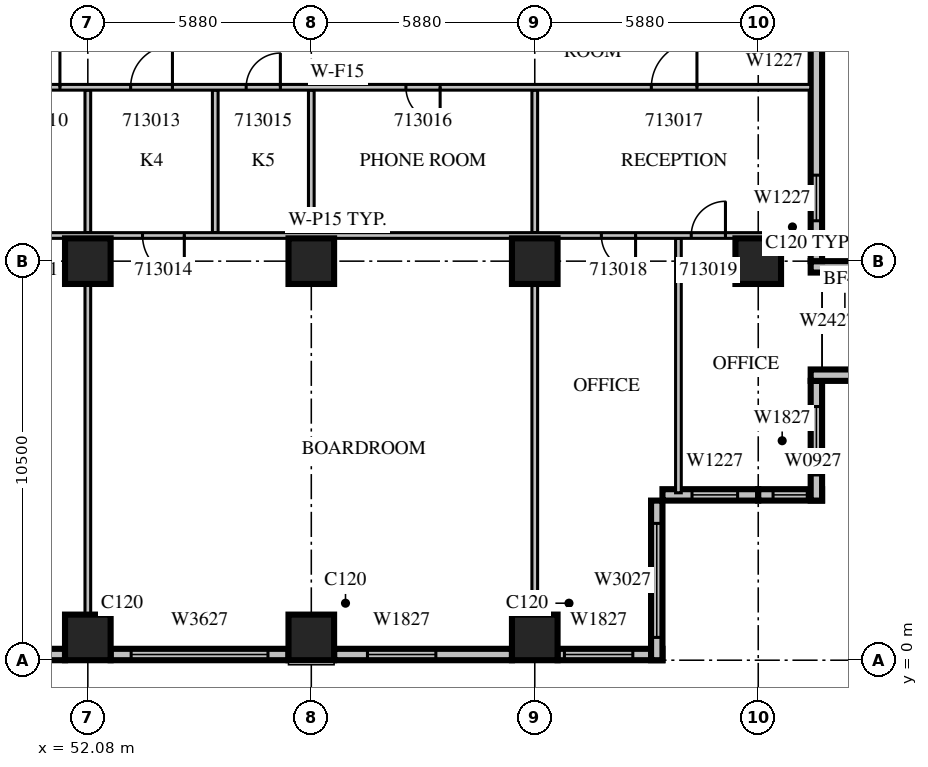
"""IFC4 building model, lengths in metres.
Left out: names, types, materials, properties, quantities, classifications, styles, units other than length and angle.
Written with IfcOpenShell. Run it as: python <this file> out.ifc"""

import sys

from ifc_helpers import new_model, si_unit, direction, frame, frame_2d, origin, origin_2d, place, context, subcontext, project, spatial, rectangle, extrude, source, transform, mapped, element, fill, save


model = new_model("IFC4")
c1 = context("Model", 3, precision=1e-05, world=origin(), true_north=direction((0.0, 1.0)))
c2 = subcontext(c1, "Body", "Model", "MODEL_VIEW")
j1 = project(units=[si_unit("LENGTHUNIT", "METRE"), si_unit("PLANEANGLEUNIT", "RADIAN")], contexts=[c1])
p1 = place(None, origin())
s1 = spatial("IfcSite", under=j1, at=p1, CompositionType="ELEMENT")
p2 = place(p1, origin())
s2 = spatial("IfcBuilding", under=s1, at=p2, CompositionType="ELEMENT")
p3 = place(p2, frame((0.0, 0.0, 65.7)))
s3 = spatial("IfcBuildingStorey", under=s2, at=p3, CompositionType="ELEMENT", Elevation=65.7)
m1 = source(origin(), c2, "Body", "SweptSolid", [
    extrude(rectangle(XDim=1.2, YDim=1.2, at=origin_2d()), origin(), (0.0, 0.0, 1.0), 4.2),
])
for number, where, z_axis, x_axis in (
    (1, (52.08, 0.6, 0.0), (0.0, 0.0, 1.0), (1.0, 0.0, 0.0)),
    (2, (57.96, 0.6, 0.0), (0.0, 0.0, 1.0), (1.0, 0.0, 0.0)),
    (3, (63.84, 0.6, 0.0), (0.0, 0.0, 1.0), (1.0, 0.0, 0.0)),
    (4, (52.08, 10.5, 0.0), (0.0, 0.0, 1.0), (1.0, 0.0, 0.0)),
    (5, (57.96, 10.5, 0.0), (0.0, 0.0, 1.0), (1.0, 0.0, 0.0)),
    (6, (63.84, 10.5, 0.0), (0.0, 0.0, 1.0), (1.0, 0.0, 0.0)),
    (7, (69.72, 10.5, 0.0), (0.0, 0.0, 1.0), (1.0, 0.0, 0.0)),
):
    element("IfcColumn", number, at=place(p3, frame(where, z_axis=z_axis, x_axis=x_axis)), inside=s3, PredefinedType="COLUMN", context=c2, shape_type="MappedRepresentation", body=[
        mapped(m1, transform((0.0, 0.0, 0.0), scale=1.0)),
    ])
m2 = source(origin(), c2, "Body", "SweptSolid", [
    extrude(rectangle(XDim=4.68, YDim=0.3, at=frame_2d((2.34, 0.0))), origin(), (0.0, 0.0, 1.0), 3.8),
])
p4 = place(p3, frame((46.8, 0.15, 0.0), z_axis=(0.0, 0.0, 1.0), x_axis=(1.0, 0.0, 0.0)))
e8 = element("IfcWall", 8, at=p4, inside=s3, PredefinedType="STANDARD", context=c2, shape_type="MappedRepresentation", body=[
    mapped(m2, transform((0.0, 0.0, 0.0), scale=1.0)),
])
m3 = source(origin(), c2, "Body", "SweptSolid", [
    extrude(rectangle(XDim=3.6, YDim=2.7, at=frame_2d((1.8, 1.35))), frame((0.0, 0.16, 0.0), z_axis=(0.0, -1.0, 0.0), x_axis=(1.0, 0.0, 0.0)), (0.0, 0.0, 1.0), 0.32),
])
p5 = place(p4, frame((0.54, 0.0, 0.6)))
e9 = element("IfcOpeningElement", 9, at=p5, cuts=e8, PredefinedType="OPENING", context=c2, shape_type="MappedRepresentation", body=[
    mapped(m3, transform((0.0, 0.0, 0.0), scale=1.0)),
])
p6 = place(p3, frame((52.68, 0.15, 0.0), z_axis=(0.0, 0.0, 1.0), x_axis=(1.0, 0.0, 0.0)))
e10 = element("IfcWall", 10, at=p6, inside=s3, PredefinedType="STANDARD", context=c2, shape_type="MappedRepresentation", body=[
    mapped(m2, transform((0.0, 0.0, 0.0), scale=1.0)),
])
p7 = place(p6, frame((0.54, 0.0, 0.6)))
e11 = element("IfcOpeningElement", 11, at=p7, cuts=e10, PredefinedType="OPENING", context=c2, shape_type="MappedRepresentation", body=[
    mapped(m3, transform((0.0, 0.0, 0.0), scale=1.0)),
])
p8 = place(p3, frame((58.56, 0.15, 0.0), z_axis=(0.0, 0.0, 1.0), x_axis=(1.0, 0.0, 0.0)))
e12 = element("IfcWall", 12, at=p8, inside=s3, PredefinedType="STANDARD", context=c2, shape_type="MappedRepresentation", body=[
    mapped(m2, transform((0.0, 0.0, 0.0), scale=1.0)),
])
m4 = source(origin(), c2, "Body", "SweptSolid", [
    extrude(rectangle(XDim=1.8, YDim=2.7, at=frame_2d((0.9, 1.35))), frame((0.0, 0.16, 0.0), z_axis=(0.0, -1.0, 0.0), x_axis=(1.0, 0.0, 0.0)), (0.0, 0.0, 1.0), 0.32),
])
p9 = place(p8, frame((0.877, 0.0, 0.6)))
e13 = element("IfcOpeningElement", 13, at=p9, cuts=e12, PredefinedType="OPENING", context=c2, shape_type="MappedRepresentation", body=[
    mapped(m4, transform((0.0, 0.0, 0.0), scale=1.0)),
])
m5 = source(origin(), c2, "Body", "SweptSolid", [
    extrude(rectangle(XDim=2.76, YDim=0.3, at=frame_2d((1.38, 0.0))), origin(), (0.0, 0.0, 1.0), 3.8),
])
p10 = place(p3, frame((64.44, 0.15, 0.0), z_axis=(0.0, 0.0, 1.0), x_axis=(1.0, 0.0, 0.0)))
e14 = element("IfcWall", 14, at=p10, inside=s3, PredefinedType="STANDARD", context=c2, shape_type="MappedRepresentation", body=[
    mapped(m5, transform((0.0, 0.0, 0.0), scale=1.0)),
])
p11 = place(p10, frame((0.18, 0.0, 0.6)))
e15 = element("IfcOpeningElement", 15, at=p11, cuts=e14, PredefinedType="OPENING", context=c2, shape_type="MappedRepresentation", body=[
    mapped(m4, transform((0.0, 0.0, 0.0), scale=1.0)),
])
m6 = source(origin(), c2, "Body", "SweptSolid", [
    extrude(rectangle(XDim=4.2, YDim=0.3, at=frame_2d((2.1, 0.0))), origin(), (0.0, 0.0, 1.0), 3.8),
])
p12 = place(p3, frame((67.05, 0.0, 0.0), z_axis=(0.0, 0.0, 1.0), x_axis=(0.0, 1.0, 0.0)))
e16 = element("IfcWall", 16, at=p12, inside=s3, PredefinedType="STANDARD", context=c2, shape_type="MappedRepresentation", body=[
    mapped(m6, transform((0.0, 0.0, 0.0), scale=1.0)),
])
m7 = source(origin(), c2, "Body", "SweptSolid", [
    extrude(rectangle(XDim=3.0, YDim=2.7, at=frame_2d((1.5, 1.35))), frame((0.0, 0.16, 0.0), z_axis=(0.0, -1.0, 0.0), x_axis=(1.0, 0.0, 0.0)), (0.0, 0.0, 1.0), 0.32),
])
p13 = place(p12, frame((0.6, 0.0, 0.6)))
e17 = element("IfcOpeningElement", 17, at=p13, cuts=e16, PredefinedType="OPENING", context=c2, shape_type="MappedRepresentation", body=[
    mapped(m7, transform((0.0, 0.0, 0.0), scale=1.0)),
])
m8 = source(origin(), c2, "Body", "SweptSolid", [
    extrude(rectangle(XDim=2.52, YDim=0.3, at=frame_2d((1.26, 0.0))), origin(), (0.0, 0.0, 1.0), 3.8),
])
p14 = place(p3, frame((67.2, 4.35, 0.0), z_axis=(0.0, 0.0, 1.0), x_axis=(1.0, 0.0, 0.0)))
e18 = element("IfcWall", 18, at=p14, inside=s3, PredefinedType="STANDARD", context=c2, shape_type="MappedRepresentation", body=[
    mapped(m8, transform((0.0, 0.0, 0.0), scale=1.0)),
])
m9 = source(origin(), c2, "Body", "SweptSolid", [
    extrude(rectangle(XDim=1.2, YDim=2.7, at=frame_2d((0.6, 1.35))), frame((0.0, 0.16, 0.0), z_axis=(0.0, -1.0, 0.0), x_axis=(1.0, 0.0, 0.0)), (0.0, 0.0, 1.0), 0.32),
])
p15 = place(p14, frame((0.777, 0.0, 0.6)))
e19 = element("IfcOpeningElement", 19, at=p15, cuts=e18, PredefinedType="OPENING", context=c2, shape_type="MappedRepresentation", body=[
    mapped(m9, transform((0.0, 0.0, 0.0), scale=1.0)),
])
m10 = source(origin(), c2, "Body", "SweptSolid", [
    extrude(rectangle(XDim=1.68, YDim=0.3, at=frame_2d((0.84, 0.0))), origin(), (0.0, 0.0, 1.0), 3.8),
])
p16 = place(p3, frame((69.72, 4.35, 0.0), z_axis=(0.0, 0.0, 1.0), x_axis=(1.0, 0.0, 0.0)))
e20 = element("IfcWall", 20, at=p16, inside=s3, PredefinedType="STANDARD", context=c2, shape_type="MappedRepresentation", body=[
    mapped(m10, transform((0.0, 0.0, 0.0), scale=1.0)),
])
m11 = source(origin(), c2, "Body", "SweptSolid", [
    extrude(rectangle(XDim=0.9, YDim=2.7, at=frame_2d((0.45, 1.35))), frame((0.0, 0.16, 0.0), z_axis=(0.0, -1.0, 0.0), x_axis=(1.0, 0.0, 0.0)), (0.0, 0.0, 1.0), 0.32),
])
p17 = place(p16, frame((0.39, 0.0, 0.6)))
e21 = element("IfcOpeningElement", 21, at=p17, cuts=e20, PredefinedType="OPENING", context=c2, shape_type="MappedRepresentation", body=[
    mapped(m11, transform((0.0, 0.0, 0.0), scale=1.0)),
])
m12 = source(origin(), c2, "Body", "SweptSolid", [
    extrude(rectangle(XDim=3.15, YDim=0.3, at=frame_2d((1.575, 0.0))), origin(), (0.0, 0.0, 1.0), 3.8),
])
p18 = place(p3, frame((71.25, 4.2, 0.0), z_axis=(0.0, 0.0, 1.0), x_axis=(0.0, 1.0, 0.0)))
e22 = element("IfcWall", 22, at=p18, inside=s3, PredefinedType="STANDARD", context=c2, shape_type="MappedRepresentation", body=[
    mapped(m12, transform((0.0, 0.0, 0.0), scale=1.0)),
])
p19 = place(p18, frame((0.675, 0.0, 0.6)))
e23 = element("IfcOpeningElement", 23, at=p19, cuts=e22, PredefinedType="OPENING", context=c2, shape_type="MappedRepresentation", body=[
    mapped(m4, transform((0.0, 0.0, 0.0), scale=1.0)),
])
m13 = source(origin(), c2, "Body", "SweptSolid", [
    extrude(rectangle(XDim=1.2, YDim=0.3, at=frame_2d((0.6, 0.0))), origin(), (0.0, 0.0, 1.0), 3.8),
])
for number, where, z_axis, x_axis in (
    (24, (71.1, 7.5, 0.0), (0.0, 0.0, 1.0), (1.0, 0.0, 0.0)),
    (25, (71.1, 10.35, 0.0), (0.0, 0.0, 1.0), (1.0, 0.0, 0.0)),
):
    element("IfcWall", number, at=place(p3, frame(where, z_axis=z_axis, x_axis=x_axis)), inside=s3, PredefinedType="STANDARD", context=c2, shape_type="MappedRepresentation", body=[
        mapped(m13, transform((0.0, 0.0, 0.0), scale=1.0)),
    ])
m14 = source(origin(), c2, "Body", "SweptSolid", [
    extrude(rectangle(XDim=6.3, YDim=0.3, at=frame_2d((3.15, 0.0))), origin(), (0.0, 0.0, 1.0), 3.8),
])
p20 = place(p3, frame((71.25, 10.5, 0.0), z_axis=(0.0, 0.0, 1.0), x_axis=(0.0, 1.0, 0.0)))
e26 = element("IfcWall", 26, at=p20, inside=s3, PredefinedType="STANDARD", context=c2, shape_type="MappedRepresentation", body=[
    mapped(m14, transform((0.0, 0.0, 0.0), scale=1.0)),
])
p21 = place(p20, frame((1.062, 0.0, 0.6)))
e27 = element("IfcOpeningElement", 27, at=p21, cuts=e26, PredefinedType="OPENING", context=c2, shape_type="MappedRepresentation", body=[
    mapped(m9, transform((0.0, 0.0, 0.0), scale=1.0)),
])
m15 = source(origin(), c2, "Body", "SweptSolid", [
    extrude(rectangle(XDim=3.75, YDim=0.15, at=frame_2d((1.875, 0.0))), origin(), (0.0, 0.0, 1.0), 3.8),
])
for number, where, z_axis, x_axis in (
    (28, (55.433, 11.25, 0.0), (0.0, 0.0, 1.0), (0.0, 1.0, 0.0)),
    (29, (57.96, 11.25, 0.0), (0.0, 0.0, 1.0), (0.0, 1.0, 0.0)),
):
    element("IfcWall", number, at=place(p3, frame(where, z_axis=z_axis, x_axis=x_axis)), inside=s3, PredefinedType="PARTITIONING", context=c2, shape_type="MappedRepresentation", body=[
        mapped(m15, transform((0.0, 0.0, 0.0), scale=1.0)),
    ])
m16 = source(origin(), c2, "Body", "SweptSolid", [
    extrude(rectangle(XDim=6.695, YDim=0.15, at=frame_2d((3.348, 0.0))), origin(), (0.0, 0.0, 1.0), 3.8),
])
p22 = place(p3, frame((67.62, 4.405, 0.0), z_axis=(0.0, 0.0, 1.0), x_axis=(0.0, 1.0, 0.0)))
e30 = element("IfcWall", 30, at=p22, inside=s3, PredefinedType="PARTITIONING", context=c2, shape_type="MappedRepresentation", body=[
    mapped(m16, transform((0.0, 0.0, 0.0), scale=1.0)),
])
m17 = source(origin(), c2, "Body", "SweptSolid", [
    extrude(rectangle(XDim=8.702, YDim=0.15, at=frame_2d((4.351, 0.0))), origin(), (0.0, 0.0, 1.0), 3.8),
])
p23 = place(p3, frame((52.08, 1.199, 0.0), z_axis=(0.0, 0.0, 1.0), x_axis=(0.0, 1.0, 0.0)))
e31 = element("IfcWall", 31, at=p23, inside=s3, PredefinedType="PARTITIONING", context=c2, shape_type="MappedRepresentation", body=[
    mapped(m17, transform((0.0, 0.0, 0.0), scale=1.0)),
])
p24 = place(p3, frame((52.08, 11.25, 0.0), z_axis=(0.0, 0.0, 1.0), x_axis=(0.0, 1.0, 0.0)))
e32 = element("IfcWall", 32, at=p24, inside=s3, PredefinedType="PARTITIONING", context=c2, shape_type="MappedRepresentation", body=[
    mapped(m15, transform((0.0, 0.0, 0.0), scale=1.0)),
])
p25 = place(p3, frame((63.84, 1.199, 0.0), z_axis=(0.0, 0.0, 1.0), x_axis=(0.0, 1.0, 0.0)))
e33 = element("IfcWall", 33, at=p25, inside=s3, PredefinedType="PARTITIONING", context=c2, shape_type="MappedRepresentation", body=[
    mapped(m17, transform((0.0, 0.0, 0.0), scale=1.0)),
])
p26 = place(p3, frame((63.84, 11.25, 0.0), z_axis=(0.0, 0.0, 1.0), x_axis=(0.0, 1.0, 0.0)))
e34 = element("IfcWall", 34, at=p26, inside=s3, PredefinedType="PARTITIONING", context=c2, shape_type="MappedRepresentation", body=[
    mapped(m15, transform((0.0, 0.0, 0.0), scale=1.0)),
])
m18 = source(origin(), c2, "Body", "SweptSolid", [
    extrude(rectangle(XDim=24.9, YDim=0.15, at=frame_2d((12.45, 0.0))), origin(), (0.0, 0.0, 1.0), 3.8),
])
p27 = place(p3, frame((71.1, 11.175, 0.0), z_axis=(0.0, 0.0, 1.0), x_axis=(-1.0, 0.0, 0.0)))
e35 = element("IfcWall", 35, at=p27, inside=s3, PredefinedType="PARTITIONING", context=c2, shape_type="MappedRepresentation", body=[
    mapped(m18, transform((0.0, 0.0, 0.0), scale=1.0)),
])
m19 = source(origin(), c2, "Body", "SweptSolid", [
    extrude(rectangle(XDim=1.1, YDim=2.1, at=frame_2d((0.55, 1.05))), frame((0.0, 0.085, 0.0), z_axis=(0.0, -1.0, 0.0), x_axis=(1.0, 0.0, 0.0)), (0.0, 0.0, 1.0), 0.17),
])
p28 = place(p27, frame((20.017, 0.0, 0.0)))
e36 = element("IfcOpeningElement", 36, at=p28, cuts=e35, PredefinedType="OPENING", context=c2, shape_type="MappedRepresentation", body=[
    mapped(m19, transform((0.0, 0.0, 0.0), scale=1.0)),
])
p29 = place(p27, frame((16.481, 0.0, 0.0)))
e37 = element("IfcOpeningElement", 37, at=p29, cuts=e35, PredefinedType="OPENING", context=c2, shape_type="MappedRepresentation", body=[
    mapped(m19, transform((0.0, 0.0, 0.0), scale=1.0)),
])
m20 = source(origin(), c2, "Body", "SweptSolid", [
    extrude(rectangle(XDim=0.9, YDim=2.1, at=frame_2d((0.45, 1.05))), frame((0.0, 0.085, 0.0), z_axis=(0.0, -1.0, 0.0), x_axis=(1.0, 0.0, 0.0)), (0.0, 0.0, 1.0), 0.17),
])
p30 = place(p27, frame((4.607, 0.0, 0.0)))
e38 = element("IfcOpeningElement", 38, at=p30, cuts=e35, PredefinedType="OPENING", context=c2, shape_type="MappedRepresentation", body=[
    mapped(m20, transform((0.0, 0.0, 0.0), scale=1.0)),
])
p31 = place(p27, frame((2.243, 0.0, 0.0)))
e39 = element("IfcOpeningElement", 39, at=p31, cuts=e35, PredefinedType="OPENING", context=c2, shape_type="MappedRepresentation", body=[
    mapped(m20, transform((0.0, 0.0, 0.0), scale=1.0)),
])
p32 = place(p3, frame((71.1, 15.075, 0.0), z_axis=(0.0, 0.0, 1.0), x_axis=(-1.0, 0.0, 0.0)))
e40 = element("IfcWall", 40, at=p32, inside=s3, PredefinedType="PARTITIONING", context=c2, shape_type="MappedRepresentation", body=[
    mapped(m18, transform((0.0, 0.0, 0.0), scale=1.0)),
])
p33 = place(p32, frame((19.754, 0.0, 0.0)))
e41 = element("IfcOpeningElement", 41, at=p33, cuts=e40, PredefinedType="OPENING", context=c2, shape_type="MappedRepresentation", body=[
    mapped(m19, transform((0.0, 0.0, 0.0), scale=1.0)),
])
p34 = place(p32, frame((22.794, 0.0, 0.0)))
e42 = element("IfcOpeningElement", 42, at=p34, cuts=e40, PredefinedType="OPENING", context=c2, shape_type="MappedRepresentation", body=[
    mapped(m20, transform((0.0, 0.0, 0.0), scale=1.0)),
])
p35 = place(p32, frame((16.794, 0.0, 0.0)))
e43 = element("IfcOpeningElement", 43, at=p35, cuts=e40, PredefinedType="OPENING", context=c2, shape_type="MappedRepresentation", body=[
    mapped(m19, transform((0.0, 0.0, 0.0), scale=1.0)),
])
p36 = place(p32, frame((13.954, 0.0, 0.0)))
e44 = element("IfcOpeningElement", 44, at=p36, cuts=e40, PredefinedType="OPENING", context=c2, shape_type="MappedRepresentation", body=[
    mapped(m20, transform((0.0, 0.0, 0.0), scale=1.0)),
])
p37 = place(p32, frame((9.75, 0.0, 0.0)))
e45 = element("IfcOpeningElement", 45, at=p37, cuts=e40, PredefinedType="OPENING", context=c2, shape_type="MappedRepresentation", body=[
    mapped(m20, transform((0.0, 0.0, 0.0), scale=1.0)),
])
m21 = source(origin(), c2, "Body", "SweptSolid", [
    extrude(rectangle(XDim=1.2, YDim=2.1, at=frame_2d((0.6, 1.05))), frame((0.0, 0.085, 0.0), z_axis=(0.0, -1.0, 0.0), x_axis=(1.0, 0.0, 0.0)), (0.0, 0.0, 1.0), 0.17),
])
p38 = place(p32, frame((2.993, 0.0, 0.0)))
e46 = element("IfcOpeningElement", 46, at=p38, cuts=e40, PredefinedType="OPENING", context=c2, shape_type="MappedRepresentation", body=[
    mapped(m21, transform((0.0, 0.0, 0.0), scale=1.0)),
])
m22 = source(origin(), c2, "Body", "SweptSolid", [
    extrude(rectangle(XDim=3.6, YDim=2.7, at=frame_2d((1.8, 1.35))), frame((0.0, 0.03, 0.0), z_axis=(0.0, -1.0, 0.0), x_axis=(1.0, 0.0, 0.0)), (0.0, 0.0, 1.0), 0.06),
])
p39 = place(p7, origin())
e47 = element("IfcWindow", 47, at=p39, inside=s3, PartitioningType="SINGLE_PANEL", PredefinedType="WINDOW", context=c2, shape_type="MappedRepresentation", body=[
    mapped(m22, transform((0.0, 0.0, 0.0), scale=1.0)),
])
fill(e11, e47)
m23 = source(origin(), c2, "Body", "SweptSolid", [
    extrude(rectangle(XDim=1.8, YDim=2.7, at=frame_2d((0.9, 1.35))), frame((0.0, 0.03, 0.0), z_axis=(0.0, -1.0, 0.0), x_axis=(1.0, 0.0, 0.0)), (0.0, 0.0, 1.0), 0.06),
])
p40 = place(p9, origin())
e48 = element("IfcWindow", 48, at=p40, inside=s3, PartitioningType="SINGLE_PANEL", PredefinedType="WINDOW", context=c2, shape_type="MappedRepresentation", body=[
    mapped(m23, transform((0.0, 0.0, 0.0), scale=1.0)),
])
fill(e13, e48)
p41 = place(p11, origin())
e49 = element("IfcWindow", 49, at=p41, inside=s3, PartitioningType="SINGLE_PANEL", PredefinedType="WINDOW", context=c2, shape_type="MappedRepresentation", body=[
    mapped(m23, transform((0.0, 0.0, 0.0), scale=1.0)),
])
fill(e15, e49)
m24 = source(origin(), c2, "Body", "SweptSolid", [
    extrude(rectangle(XDim=3.0, YDim=2.7, at=frame_2d((1.5, 1.35))), frame((0.0, 0.03, 0.0), z_axis=(0.0, -1.0, 0.0), x_axis=(1.0, 0.0, 0.0)), (0.0, 0.0, 1.0), 0.06),
])
p42 = place(p13, origin())
e50 = element("IfcWindow", 50, at=p42, inside=s3, PartitioningType="SINGLE_PANEL", PredefinedType="WINDOW", context=c2, shape_type="MappedRepresentation", body=[
    mapped(m24, transform((0.0, 0.0, 0.0), scale=1.0)),
])
fill(e17, e50)
m25 = source(origin(), c2, "Body", "SweptSolid", [
    extrude(rectangle(XDim=1.2, YDim=2.7, at=frame_2d((0.6, 1.35))), frame((0.0, 0.03, 0.0), z_axis=(0.0, -1.0, 0.0), x_axis=(1.0, 0.0, 0.0)), (0.0, 0.0, 1.0), 0.06),
])
p43 = place(p15, origin())
e51 = element("IfcWindow", 51, at=p43, inside=s3, PartitioningType="SINGLE_PANEL", PredefinedType="WINDOW", context=c2, shape_type="MappedRepresentation", body=[
    mapped(m25, transform((0.0, 0.0, 0.0), scale=1.0)),
])
fill(e19, e51)
m26 = source(origin(), c2, "Body", "SweptSolid", [
    extrude(rectangle(XDim=0.9, YDim=2.7, at=frame_2d((0.45, 1.35))), frame((0.0, 0.03, 0.0), z_axis=(0.0, -1.0, 0.0), x_axis=(1.0, 0.0, 0.0)), (0.0, 0.0, 1.0), 0.06),
])
p44 = place(p17, origin())
e52 = element("IfcWindow", 52, at=p44, inside=s3, PartitioningType="SINGLE_PANEL", PredefinedType="WINDOW", context=c2, shape_type="MappedRepresentation", body=[
    mapped(m26, transform((0.0, 0.0, 0.0), scale=1.0)),
])
fill(e21, e52)
p45 = place(p19, origin())
e53 = element("IfcWindow", 53, at=p45, inside=s3, PartitioningType="SINGLE_PANEL", PredefinedType="WINDOW", context=c2, shape_type="MappedRepresentation", body=[
    mapped(m23, transform((0.0, 0.0, 0.0), scale=1.0)),
])
fill(e23, e53)
p46 = place(p21, origin())
e54 = element("IfcWindow", 54, at=p46, inside=s3, PartitioningType="SINGLE_PANEL", PredefinedType="WINDOW", context=c2, shape_type="MappedRepresentation", body=[
    mapped(m25, transform((0.0, 0.0, 0.0), scale=1.0)),
])
fill(e27, e54)
m27 = source(origin(), c2, "Body", "SweptSolid", [
    extrude(rectangle(XDim=1.1, YDim=2.1, at=frame_2d((0.55, 1.05))), frame((0.0, 0.025, 0.0), z_axis=(0.0, -1.0, 0.0), x_axis=(1.0, 0.0, 0.0)), (0.0, 0.0, 1.0), 0.05),
])
p47 = place(p33, origin())
e55 = element("IfcDoor", 55, at=p47, inside=s3, OperationType="SINGLE_SWING_RIGHT", PredefinedType="DOOR", context=c2, shape_type="MappedRepresentation", body=[
    mapped(m27, transform((0.0, 0.0, 0.0), scale=1.0)),
])
fill(e41, e55)
p48 = place(p35, origin())
e56 = element("IfcDoor", 56, at=p48, inside=s3, OperationType="SINGLE_SWING_RIGHT", PredefinedType="DOOR", context=c2, shape_type="MappedRepresentation", body=[
    mapped(m27, transform((0.0, 0.0, 0.0), scale=1.0)),
])
fill(e43, e56)
p49 = place(p29, origin())
e57 = element("IfcDoor", 57, at=p49, inside=s3, OperationType="SINGLE_SWING_LEFT", PredefinedType="DOOR", context=c2, shape_type="MappedRepresentation", body=[
    mapped(m27, transform((0.0, 0.0, 0.0), scale=1.0)),
])
fill(e37, e57)
m28 = source(origin(), c2, "Body", "SweptSolid", [
    extrude(rectangle(XDim=0.9, YDim=2.1, at=frame_2d((0.45, 1.05))), frame((0.0, 0.025, 0.0), z_axis=(0.0, -1.0, 0.0), x_axis=(1.0, 0.0, 0.0)), (0.0, 0.0, 1.0), 0.05),
])
p50 = place(p36, origin())
e58 = element("IfcDoor", 58, at=p50, inside=s3, OperationType="SINGLE_SWING_RIGHT", PredefinedType="DOOR", context=c2, shape_type="MappedRepresentation", body=[
    mapped(m28, transform((0.0, 0.0, 0.0), scale=1.0)),
])
fill(e44, e58)
p51 = place(p37, origin())
e59 = element("IfcDoor", 59, at=p51, inside=s3, OperationType="SINGLE_SWING_LEFT", PredefinedType="DOOR", context=c2, shape_type="MappedRepresentation", body=[
    mapped(m28, transform((0.0, 0.0, 0.0), scale=1.0)),
])
fill(e45, e59)
m29 = source(origin(), c2, "Body", "SweptSolid", [
    extrude(rectangle(XDim=1.2, YDim=2.1, at=frame_2d((0.6, 1.05))), frame((0.0, 0.025, 0.0), z_axis=(0.0, -1.0, 0.0), x_axis=(1.0, 0.0, 0.0)), (0.0, 0.0, 1.0), 0.05),
])
p52 = place(p38, origin())
e60 = element("IfcDoor", 60, at=p52, inside=s3, OperationType="SINGLE_SWING_RIGHT", PredefinedType="DOOR", context=c2, shape_type="MappedRepresentation", body=[
    mapped(m29, transform((0.0, 0.0, 0.0), scale=1.0)),
])
fill(e46, e60)
p53 = place(p30, origin())
e61 = element("IfcDoor", 61, at=p53, inside=s3, OperationType="SINGLE_SWING_LEFT", PredefinedType="DOOR", context=c2, shape_type="MappedRepresentation", body=[
    mapped(m28, transform((0.0, 0.0, 0.0), scale=1.0)),
])
fill(e38, e61)
p54 = place(p31, origin())
e62 = element("IfcDoor", 62, at=p54, inside=s3, OperationType="SINGLE_SWING_RIGHT", PredefinedType="DOOR", context=c2, shape_type="MappedRepresentation", body=[
    mapped(m28, transform((0.0, 0.0, 0.0), scale=1.0)),
])
fill(e39, e62)
save(model, sys.argv[1])
